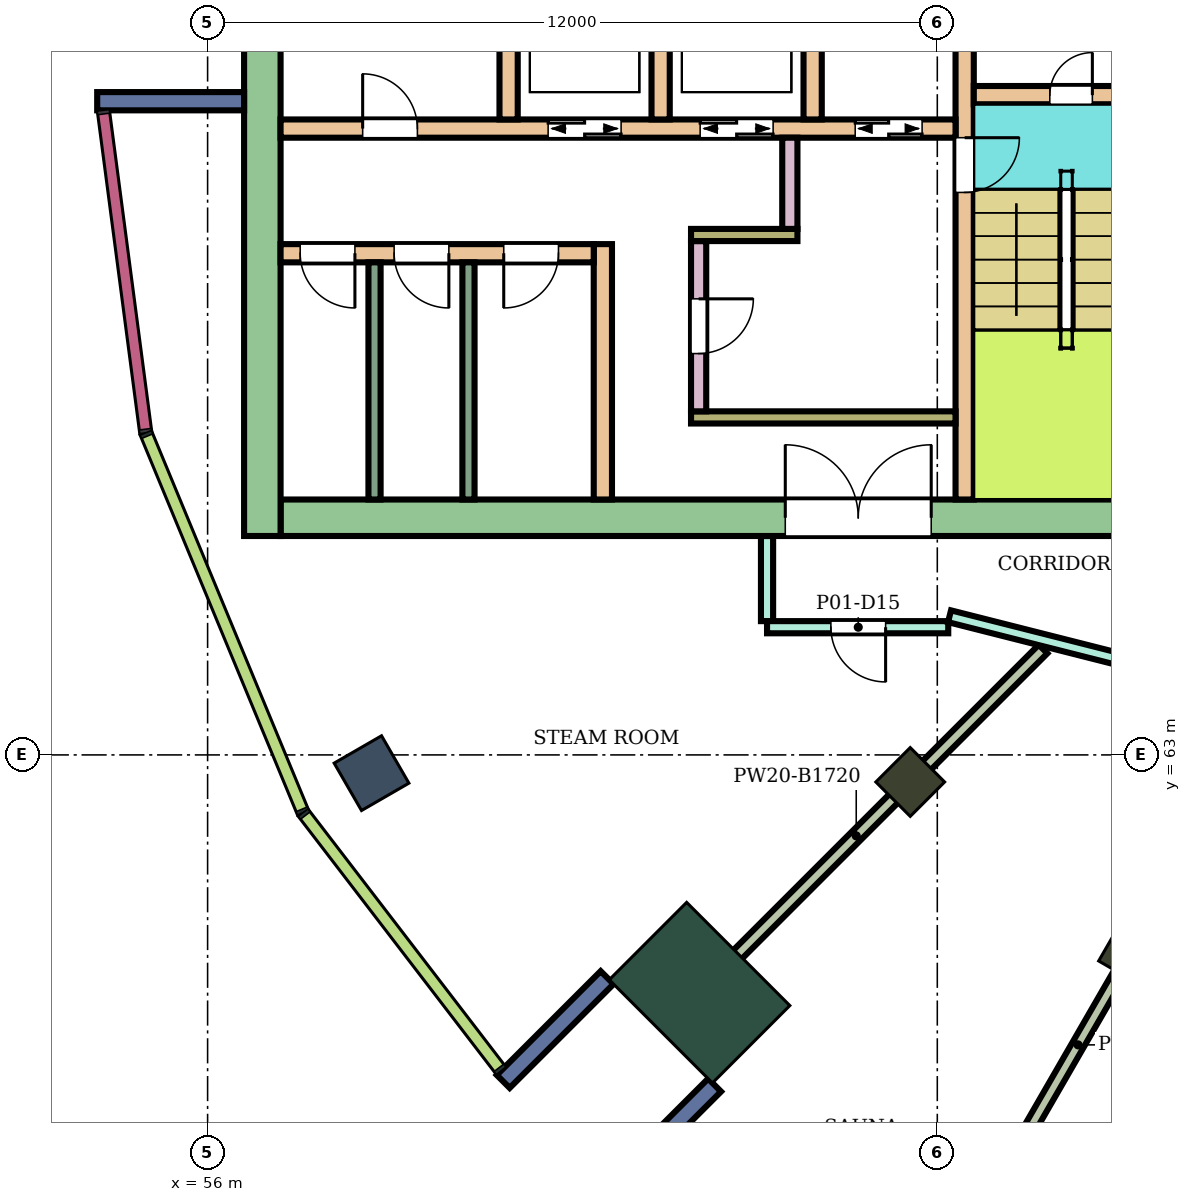
"""IFC4 building model, lengths in metres.
Left out: names, types, materials, properties, quantities, classifications, styles, units other than length and angle.
Written with IfcOpenShell. Run it as: python <this file> out.ifc"""

import sys

from ifc_helpers import new_model, si_unit, direction, frame, frame_2d, origin, origin_2d, place, context, subcontext, project, spatial, rectangle, extrude, element, fill, save


model = new_model("IFC4")
c1 = context("Model", 3, precision=1e-05, world=origin(), true_north=direction((0.0, 1.0)))
c2 = subcontext(c1, "Body", "Model", "MODEL_VIEW")
j1 = project(units=[si_unit("LENGTHUNIT", "METRE"), si_unit("PLANEANGLEUNIT", "RADIAN")], contexts=[c1])
p1 = place(None, origin())
s1 = spatial("IfcSite", under=j1, at=p1, CompositionType="ELEMENT")
p2 = place(p1, origin())
s2 = spatial("IfcBuilding", under=s1, at=p2, CompositionType="ELEMENT")
p3 = place(p2, frame((0.0, 0.0, 270.9)))
s3 = spatial("IfcBuildingStorey", under=s2, at=p3, CompositionType="ELEMENT", Elevation=270.9)
p4 = place(p3, frame((58.696, 62.7, 0.0), z_axis=(0.0, 0.0, 1.0), x_axis=(-0.866025403784, -0.5, 0.0)))
e1 = element("IfcColumn", 1, at=p4, inside=s3, PredefinedType="COLUMN", context=c2, shape_type="SweptSolid", body=[
    extrude(rectangle(XDim=0.9, YDim=0.9, at=origin_2d()), origin(), (0.0, 0.0, 1.0), 4.8),
])
for number, where, z_axis, x_axis in (
    (2, (67.555, 62.555, 0.0), (0.0, 0.0, 1.0), (-0.707, -0.707, 0.0)),
    (3, (71.2, 59.758, 0.0), (0.0, 0.0, 1.0), (-0.5, -0.866, 0.0)),
):
    element("IfcColumn", number, at=place(p3, frame(where, z_axis=z_axis, x_axis=x_axis)), inside=s3, PredefinedType="COLUMN", context=c2, shape_type="SweptSolid", body=[
        extrude(rectangle(XDim=0.8, YDim=0.8, at=origin_2d()), origin(), (0.0, 0.0, 1.0), 4.8),
    ])
p5 = place(p3, frame((64.09, 59.09, 0.0), z_axis=(0.0, 0.0, 1.0), x_axis=(-0.707106781187, -0.707106781187, 0.0)))
e4 = element("IfcColumn", 4, at=p5, inside=s3, PredefinedType="COLUMN", context=c2, shape_type="SweptSolid", body=[
    extrude(rectangle(XDim=1.8, YDim=2.4, at=origin_2d()), origin(), (0.0, 0.0, 1.0), 4.8),
])
p6 = place(p3, frame((72.1, 66.9, 0.0), z_axis=(0.0, 0.0, 1.0), x_axis=(-1.0, 0.0, 0.0)))
e5 = element("IfcWall", 5, at=p6, inside=s3, PredefinedType="SHEAR", context=c2, shape_type="SweptSolid", body=[
    extrude(rectangle(XDim=14.9, YDim=0.6, at=frame_2d((7.45, 0.0))), origin(), (0.0, 0.0, 1.0), 4.48),
])
p7 = place(p6, frame((4.2, 0.0, 0.0)))
e6 = element("IfcOpeningElement", 6, at=p7, cuts=e5, PredefinedType="OPENING", context=c2, shape_type="SweptSolid", body=[
    extrude(rectangle(XDim=2.4, YDim=2.4, at=frame_2d((1.2, 1.2))), frame((0.0, 0.31, 0.0), z_axis=(0.0, -1.0, 0.0), x_axis=(1.0, 0.0, 0.0)), (0.0, 0.0, 1.0), 0.62),
])
p8 = place(p3, frame((56.9, 83.4, 0.0), z_axis=(0.0, 0.0, 1.0), x_axis=(0.0, -1.0, 0.0)))
e7 = element("IfcWall", 7, at=p8, inside=s3, PredefinedType="SHEAR", context=c2, shape_type="SweptSolid", body=[
    extrude(rectangle(XDim=16.8, YDim=0.6, at=frame_2d((8.4, 0.0))), origin(), (0.0, 0.0, 1.0), 4.48),
])
p9 = place(p3, frame((68.45, 75.0, 0.0), z_axis=(0.0, 0.0, 1.0), x_axis=(0.0, -1.0, 0.0)))
e8 = element("IfcWall", 8, at=p9, inside=s3, PredefinedType="SHEAR", context=c2, shape_type="SweptSolid", body=[
    extrude(rectangle(XDim=7.8, YDim=0.3, at=frame_2d((3.9, 0.0))), origin(), (0.0, 0.0, 1.0), 4.48),
])
p10 = place(p9, frame((1.85, 0.0, 0.0)))
e9 = element("IfcOpeningElement", 9, at=p10, cuts=e8, PredefinedType="OPENING", context=c2, shape_type="SweptSolid", body=[
    extrude(rectangle(XDim=0.9, YDim=2.1, at=frame_2d((0.45, 1.05))), frame((0.0, 0.16, 0.0), z_axis=(0.0, -1.0, 0.0), x_axis=(1.0, 0.0, 0.0)), (0.0, 0.0, 1.0), 0.32),
])
p11 = place(p3, frame((71.65, 73.85, 0.0), z_axis=(0.0, 0.0, 1.0), x_axis=(-1.0, 0.0, 0.0)))
e10 = element("IfcWall", 10, at=p11, inside=s3, PredefinedType="SHEAR", context=c2, shape_type="SweptSolid", body=[
    extrude(rectangle(XDim=3.05, YDim=0.3, at=frame_2d((1.525, 0.0))), origin(), (0.0, 0.0, 1.0), 4.48),
])
p12 = place(p11, frame((1.1, 0.0, 0.0)))
e11 = element("IfcOpeningElement", 11, at=p12, cuts=e10, PredefinedType="OPENING", context=c2, shape_type="SweptSolid", body=[
    extrude(rectangle(XDim=0.7, YDim=2.0, at=frame_2d((0.35, 1.0))), frame((0.0, 0.16, 0.0), z_axis=(0.0, -1.0, 0.0), x_axis=(1.0, 0.0, 0.0)), (0.0, 0.0, 1.0), 0.32),
])
p13 = place(p3, frame((68.3, 73.3, 0.0), z_axis=(0.0, 0.0, 1.0), x_axis=(-1.0, 0.0, 0.0)))
e12 = element("IfcWall", 12, at=p13, inside=s3, PredefinedType="SHEAR", context=c2, shape_type="SweptSolid", body=[
    extrude(rectangle(XDim=11.1, YDim=0.3, at=frame_2d((5.55, 0.0))), origin(), (0.0, 0.0, 1.0), 4.48),
])
p14 = place(p13, frame((0.55, 0.0, 0.0)))
e13 = element("IfcOpeningElement", 13, at=p14, cuts=e12, PredefinedType="OPENING", context=c2, shape_type="SweptSolid", body=[
    extrude(rectangle(XDim=1.1, YDim=2.1, at=frame_2d((0.55, 1.05))), frame((0.0, 0.16, 0.0), z_axis=(0.0, -1.0, 0.0), x_axis=(1.0, 0.0, 0.0)), (0.0, 0.0, 1.0), 0.32),
])
p15 = place(p13, frame((3.0, 0.0, 0.0)))
e14 = element("IfcOpeningElement", 14, at=p15, cuts=e12, PredefinedType="OPENING", context=c2, shape_type="SweptSolid", body=[
    extrude(rectangle(XDim=1.2, YDim=2.1, at=frame_2d((0.6, 1.05))), frame((0.0, 0.16, 0.0), z_axis=(0.0, -1.0, 0.0), x_axis=(1.0, 0.0, 0.0)), (0.0, 0.0, 1.0), 0.32),
])
p16 = place(p13, frame((5.5, 0.0, 0.0)))
e15 = element("IfcOpeningElement", 15, at=p16, cuts=e12, PredefinedType="OPENING", context=c2, shape_type="SweptSolid", body=[
    extrude(rectangle(XDim=1.2, YDim=2.1, at=frame_2d((0.6, 1.05))), frame((0.0, 0.16, 0.0), z_axis=(0.0, -1.0, 0.0), x_axis=(1.0, 0.0, 0.0)), (0.0, 0.0, 1.0), 0.32),
])
p17 = place(p13, frame((8.85, 0.0, 0.0)))
e16 = element("IfcOpeningElement", 16, at=p17, cuts=e12, PredefinedType="OPENING", context=c2, shape_type="SweptSolid", body=[
    extrude(rectangle(XDim=0.9, YDim=2.1, at=frame_2d((0.45, 1.05))), frame((0.0, 0.16, 0.0), z_axis=(0.0, -1.0, 0.0), x_axis=(1.0, 0.0, 0.0)), (0.0, 0.0, 1.0), 0.32),
])
for number, where, z_axis, x_axis in (
    (17, (65.95, 76.0, 0.0), (0.0, 0.0, 1.0), (0.0, -1.0, 0.0)),
    (18, (63.45, 76.0, 0.0), (0.0, 0.0, 1.0), (0.0, -1.0, 0.0)),
    (19, (60.95, 76.0, 0.0), (0.0, 0.0, 1.0), (0.0, -1.0, 0.0)),
):
    element("IfcWall", number, at=place(p3, frame(where, z_axis=z_axis, x_axis=x_axis)), inside=s3, PredefinedType="SHEAR", context=c2, shape_type="SweptSolid", body=[
        extrude(rectangle(XDim=2.55, YDim=0.3, at=frame_2d((1.275, 0.0))), origin(), (0.0, 0.0, 1.0), 4.48),
    ])
p18 = place(p3, frame((68.3, 68.55, 0.0), z_axis=(0.0, 0.0, 1.0), x_axis=(-1.0, 0.0, 0.0)))
e20 = element("IfcWall", 20, at=p18, inside=s3, PredefinedType="SHEAR", context=c2, shape_type="SweptSolid", body=[
    extrude(rectangle(XDim=4.35, YDim=0.2, at=frame_2d((2.175, 0.0))), origin(), (0.0, 0.0, 1.0), 4.48),
])
p19 = place(p3, frame((64.075, 71.45, 0.0), z_axis=(0.0, 0.0, 1.0), x_axis=(0.0, -1.0, 0.0)))
e21 = element("IfcWall", 21, at=p19, inside=s3, PredefinedType="SHEAR", context=c2, shape_type="SweptSolid", body=[
    extrude(rectangle(XDim=2.8, YDim=0.25, at=frame_2d((1.4, 0.0))), origin(), (0.0, 0.0, 1.0), 4.48),
])
p20 = place(p19, frame((0.95, 0.0, 0.0)))
e22 = element("IfcOpeningElement", 22, at=p20, cuts=e21, PredefinedType="OPENING", context=c2, shape_type="SweptSolid", body=[
    extrude(rectangle(XDim=0.9, YDim=2.1, at=frame_2d((0.45, 1.05))), frame((0.0, 0.135, 0.0), z_axis=(0.0, -1.0, 0.0), x_axis=(1.0, 0.0, 0.0)), (0.0, 0.0, 1.0), 0.27),
])
p21 = place(p3, frame((65.7, 71.55, 0.0), z_axis=(0.0, 0.0, 1.0), x_axis=(-1.0, 0.0, 0.0)))
e23 = element("IfcWall", 23, at=p21, inside=s3, PredefinedType="SHEAR", context=c2, shape_type="SweptSolid", body=[
    extrude(rectangle(XDim=1.75, YDim=0.2, at=frame_2d((0.875, 0.0))), origin(), (0.0, 0.0, 1.0), 4.48),
])
p22 = place(p3, frame((65.575, 73.15, 0.0), z_axis=(0.0, 0.0, 1.0), x_axis=(0.0, -1.0, 0.0)))
e24 = element("IfcWall", 24, at=p22, inside=s3, PredefinedType="SHEAR", context=c2, shape_type="SweptSolid", body=[
    extrude(rectangle(XDim=1.5, YDim=0.25, at=frame_2d((0.75, 0.0))), origin(), (0.0, 0.0, 1.0), 4.48),
])
p23 = place(p3, frame((62.5, 71.4, 0.0), z_axis=(0.0, 0.0, 1.0), x_axis=(0.0, -1.0, 0.0)))
e25 = element("IfcWall", 25, at=p23, inside=s3, PredefinedType="SHEAR", context=c2, shape_type="SweptSolid", body=[
    extrude(rectangle(XDim=4.2, YDim=0.3, at=frame_2d((2.1, 0.0))), origin(), (0.0, 0.0, 1.0), 4.48),
])
p24 = place(p3, frame((62.35, 71.25, 0.0), z_axis=(0.0, 0.0, 1.0), x_axis=(-1.0, 0.0, 0.0)))
e26 = element("IfcWall", 26, at=p24, inside=s3, PredefinedType="SHEAR", context=c2, shape_type="SweptSolid", body=[
    extrude(rectangle(XDim=5.15, YDim=0.3, at=frame_2d((2.575, 0.0))), origin(), (0.0, 0.0, 1.0), 4.48),
])
p25 = place(p24, frame((0.58, 0.0, 0.0)))
e27 = element("IfcOpeningElement", 27, at=p25, cuts=e26, PredefinedType="OPENING", context=c2, shape_type="SweptSolid", body=[
    extrude(rectangle(XDim=0.9, YDim=2.1, at=frame_2d((0.45, 1.05))), frame((0.0, 0.16, 0.0), z_axis=(0.0, -1.0, 0.0), x_axis=(1.0, 0.0, 0.0)), (0.0, 0.0, 1.0), 0.32),
])
p26 = place(p24, frame((2.383, 0.0, 0.0)))
e28 = element("IfcOpeningElement", 28, at=p26, cuts=e26, PredefinedType="OPENING", context=c2, shape_type="SweptSolid", body=[
    extrude(rectangle(XDim=0.9, YDim=2.1, at=frame_2d((0.45, 1.05))), frame((0.0, 0.16, 0.0), z_axis=(0.0, -1.0, 0.0), x_axis=(1.0, 0.0, 0.0)), (0.0, 0.0, 1.0), 0.32),
])
p27 = place(p24, frame((3.927, 0.0, 0.0)))
e29 = element("IfcOpeningElement", 29, at=p27, cuts=e26, PredefinedType="OPENING", context=c2, shape_type="SweptSolid", body=[
    extrude(rectangle(XDim=0.9, YDim=2.1, at=frame_2d((0.45, 1.05))), frame((0.0, 0.16, 0.0), z_axis=(0.0, -1.0, 0.0), x_axis=(1.0, 0.0, 0.0)), (0.0, 0.0, 1.0), 0.32),
])
for number, where, z_axis, x_axis in (
    (30, (56.6, 73.75, 0.0), (0.0, 0.0, 1.0), (-1.0, 0.0, 0.0)),
    (31, (62.57, 59.338, 0.0), (0.0, 0.0, 1.0), (-0.707, -0.707, 0.0)),
    (32, (64.338, 57.57, 0.0), (0.0, 0.0, 1.0), (-0.707, -0.707, 0.0)),
):
    element("IfcWall", number, at=place(p3, frame(where, z_axis=z_axis, x_axis=x_axis)), inside=s3, PredefinedType="NOTDEFINED", context=c2, shape_type="SweptSolid", body=[
        extrude(rectangle(XDim=2.416, YDim=0.3, at=frame_2d((1.208, 0.0))), origin(), (0.0, 0.0, 1.0), 4.8),
    ])
p28 = place(p3, frame((63.594, 58.597, 0.0), z_axis=(0.0, 0.0, 1.0), x_axis=(0.707162972126, 0.707050585782, 0.0)))
e33 = element("IfcWall", 33, at=p28, inside=s3, PredefinedType="PARTITIONING", context=c2, shape_type="SweptSolid", body=[
    extrude(rectangle(XDim=8.689, YDim=0.2, at=frame_2d((4.345, 0.0))), origin(), (0.0, 0.0, 1.0), 3.08),
])
p29 = place(p3, frame((65.2, 65.2, 0.0), z_axis=(0.0, 0.0, 1.0), x_axis=(0.0, 1.0, 0.0)))
e34 = element("IfcWall", 34, at=p29, inside=s3, PredefinedType="PARTITIONING", context=c2, shape_type="SweptSolid", body=[
    extrude(rectangle(XDim=1.399, YDim=0.2, at=frame_2d((0.7, 0.0))), origin(), (0.0, 0.0, 1.0), 4.35),
])
p30 = place(p3, frame((65.2, 65.1, 0.0), z_axis=(0.0, 0.0, 1.0), x_axis=(1.0, 0.0, 0.0)))
e35 = element("IfcWall", 35, at=p30, inside=s3, PredefinedType="PARTITIONING", context=c2, shape_type="SweptSolid", body=[
    extrude(rectangle(XDim=2.98, YDim=0.2, at=frame_2d((1.49, 0.0))), origin(), (0.0, 0.0, 1.0), 4.35),
])
p31 = place(p30, frame((1.05, 0.0, 0.0)))
e36 = element("IfcOpeningElement", 36, at=p31, cuts=e35, PredefinedType="OPENING", context=c2, shape_type="SweptSolid", body=[
    extrude(rectangle(XDim=0.9, YDim=2.1, at=frame_2d((0.45, 1.05))), frame((0.0, 0.11, 0.0), z_axis=(0.0, -1.0, 0.0), x_axis=(1.0, 0.0, 0.0)), (0.0, 0.0, 1.0), 0.22),
])
p32 = place(p3, frame((67.097, 52.661, 0.0), z_axis=(0.0, 0.0, 1.0), x_axis=(0.500128690501, 0.865951091539, 0.0)))
e37 = element("IfcWall", 37, at=p32, inside=s3, PredefinedType="PARTITIONING", context=c2, shape_type="SweptSolid", body=[
    extrude(rectangle(XDim=12.866, YDim=0.2, at=frame_2d((6.433, 0.0))), origin(), (0.0, 0.0, 1.0), 3.08),
])
p33 = place(p3, frame((68.201, 65.28, 0.0), z_axis=(0.0, 0.0, 1.0), x_axis=(0.969376914413, -0.245577681811, 0.0)))
e38 = element("IfcWall", 38, at=p33, inside=s3, PredefinedType="PARTITIONING", context=c2, shape_type="SweptSolid", body=[
    extrude(rectangle(XDim=5.927, YDim=0.2, at=frame_2d((2.963, 0.0))), origin(), (0.0, 0.0, 1.0), 4.35),
])
p34 = place(p33, frame((3.188, 0.0, 0.0)))
e39 = element("IfcOpeningElement", 39, at=p34, cuts=e38, PredefinedType="OPENING", context=c2, shape_type="SweptSolid", body=[
    extrude(rectangle(XDim=0.9, YDim=2.1, at=frame_2d((0.45, 1.05))), frame((0.0, 0.11, 0.0), z_axis=(0.0, -1.0, 0.0), x_axis=(1.0, 0.0, 0.0)), (0.0, 0.0, 1.0), 0.22),
])
for number, where, z_axis, x_axis in (
    (40, (60.29, 71.1, 0.0), (0.0, 0.0, 1.0), (0.0, -1.0, 0.0)),
    (41, (58.745, 71.1, 0.0), (0.0, 0.0, 1.0), (0.0, -1.0, 0.0)),
):
    element("IfcWall", number, at=place(p3, frame(where, z_axis=z_axis, x_axis=x_axis)), inside=s3, PredefinedType="PARTITIONING", context=c2, shape_type="SweptSolid", body=[
        extrude(rectangle(XDim=3.9, YDim=0.2, at=frame_2d((1.95, 0.0))), origin(), (0.0, 0.0, 1.0), 4.48),
    ])
p35 = place(p31, frame((0.9, 0.0, 0.0), z_axis=(0.0, 0.0, 1.0), x_axis=(-1.0, 0.0, 0.0)))
e42 = element("IfcDoor", 42, at=p35, inside=s3, OperationType="SINGLE_SWING_LEFT", PredefinedType="DOOR", context=c2, shape_type="SweptSolid", body=[
    extrude(rectangle(XDim=0.9, YDim=2.1, at=frame_2d((0.45, 1.05))), frame((0.0, 0.025, 0.0), z_axis=(0.0, -1.0, 0.0), x_axis=(1.0, 0.0, 0.0)), (0.0, 0.0, 1.0), 0.05),
])
fill(e36, e42)
p36 = place(p12, frame((0.7, 0.0, 0.0), z_axis=(0.0, 0.0, 1.0), x_axis=(-1.0, 0.0, 0.0)))
e43 = element("IfcDoor", 43, at=p36, inside=s3, OperationType="SINGLE_SWING_RIGHT", PredefinedType="DOOR", context=c2, shape_type="SweptSolid", body=[
    extrude(rectangle(XDim=0.7, YDim=2.0, at=frame_2d((0.35, 1.0))), frame((0.0, 0.025, 0.0), z_axis=(0.0, -1.0, 0.0), x_axis=(1.0, 0.0, 0.0)), (0.0, 0.0, 1.0), 0.05),
])
fill(e11, e43)
p37 = place(p10, origin())
e44 = element("IfcDoor", 44, at=p37, inside=s3, OperationType="SINGLE_SWING_LEFT", PredefinedType="DOOR", context=c2, shape_type="SweptSolid", body=[
    extrude(rectangle(XDim=0.9, YDim=2.1, at=frame_2d((0.45, 1.05))), frame((0.0, 0.025, 0.0), z_axis=(0.0, -1.0, 0.0), x_axis=(1.0, 0.0, 0.0)), (0.0, 0.0, 1.0), 0.05),
])
fill(e9, e44)
p38 = place(p14, origin())
e45 = element("IfcDoor", 45, at=p38, inside=s3, OperationType="DOUBLE_DOOR_SLIDING", PredefinedType="DOOR", context=c2, shape_type="SweptSolid", body=[
    extrude(rectangle(XDim=1.1, YDim=2.1, at=frame_2d((0.55, 1.05))), frame((0.0, 0.025, 0.0), z_axis=(0.0, -1.0, 0.0), x_axis=(1.0, 0.0, 0.0)), (0.0, 0.0, 1.0), 0.05),
])
fill(e13, e45)
p39 = place(p15, origin())
e46 = element("IfcDoor", 46, at=p39, inside=s3, OperationType="DOUBLE_DOOR_SLIDING", PredefinedType="DOOR", context=c2, shape_type="SweptSolid", body=[
    extrude(rectangle(XDim=1.2, YDim=2.1, at=frame_2d((0.6, 1.05))), frame((0.0, 0.025, 0.0), z_axis=(0.0, -1.0, 0.0), x_axis=(1.0, 0.0, 0.0)), (0.0, 0.0, 1.0), 0.05),
])
fill(e14, e46)
p40 = place(p16, origin())
e47 = element("IfcDoor", 47, at=p40, inside=s3, OperationType="DOUBLE_DOOR_SLIDING", PredefinedType="DOOR", context=c2, shape_type="SweptSolid", body=[
    extrude(rectangle(XDim=1.2, YDim=2.1, at=frame_2d((0.6, 1.05))), frame((0.0, 0.025, 0.0), z_axis=(0.0, -1.0, 0.0), x_axis=(1.0, 0.0, 0.0)), (0.0, 0.0, 1.0), 0.05),
])
fill(e15, e47)
p41 = place(p17, frame((0.9, 0.0, 0.0), z_axis=(0.0, 0.0, 1.0), x_axis=(-1.0, 0.0, 0.0)))
e48 = element("IfcDoor", 48, at=p41, inside=s3, OperationType="SINGLE_SWING_LEFT", PredefinedType="DOOR", context=c2, shape_type="SweptSolid", body=[
    extrude(rectangle(XDim=0.9, YDim=2.1, at=frame_2d((0.45, 1.05))), frame((0.0, 0.025, 0.0), z_axis=(0.0, -1.0, 0.0), x_axis=(1.0, 0.0, 0.0)), (0.0, 0.0, 1.0), 0.05),
])
fill(e16, e48)
p42 = place(p20, origin())
e49 = element("IfcDoor", 49, at=p42, inside=s3, OperationType="SINGLE_SWING_LEFT", PredefinedType="DOOR", context=c2, shape_type="SweptSolid", body=[
    extrude(rectangle(XDim=0.9, YDim=2.1, at=frame_2d((0.45, 1.05))), frame((0.0, 0.025, 0.0), z_axis=(0.0, -1.0, 0.0), x_axis=(1.0, 0.0, 0.0)), (0.0, 0.0, 1.0), 0.05),
])
fill(e22, e49)
p43 = place(p25, origin())
e50 = element("IfcDoor", 50, at=p43, inside=s3, OperationType="SINGLE_SWING_RIGHT", PredefinedType="DOOR", context=c2, shape_type="SweptSolid", body=[
    extrude(rectangle(XDim=0.9, YDim=2.1, at=frame_2d((0.45, 1.05))), frame((0.0, 0.025, 0.0), z_axis=(0.0, -1.0, 0.0), x_axis=(1.0, 0.0, 0.0)), (0.0, 0.0, 1.0), 0.05),
])
fill(e27, e50)
p44 = place(p26, origin())
e51 = element("IfcDoor", 51, at=p44, inside=s3, OperationType="SINGLE_SWING_LEFT", PredefinedType="DOOR", context=c2, shape_type="SweptSolid", body=[
    extrude(rectangle(XDim=0.9, YDim=2.1, at=frame_2d((0.45, 1.05))), frame((0.0, 0.025, 0.0), z_axis=(0.0, -1.0, 0.0), x_axis=(1.0, 0.0, 0.0)), (0.0, 0.0, 1.0), 0.05),
])
fill(e28, e51)
p45 = place(p27, origin())
e52 = element("IfcDoor", 52, at=p45, inside=s3, OperationType="SINGLE_SWING_LEFT", PredefinedType="DOOR", context=c2, shape_type="SweptSolid", body=[
    extrude(rectangle(XDim=0.9, YDim=2.1, at=frame_2d((0.45, 1.05))), frame((0.0, 0.025, 0.0), z_axis=(0.0, -1.0, 0.0), x_axis=(1.0, 0.0, 0.0)), (0.0, 0.0, 1.0), 0.05),
])
fill(e29, e52)
p46 = place(p7, frame((2.4, 0.0, 0.0), z_axis=(0.0, 0.0, 1.0), x_axis=(-1.0, 0.0, 0.0)))
e53 = element("IfcDoor", 53, at=p46, inside=s3, OperationType="DOUBLE_DOOR_SINGLE_SWING", PredefinedType="DOOR", context=c2, shape_type="SweptSolid", body=[
    extrude(rectangle(XDim=2.4, YDim=2.4, at=frame_2d((1.2, 1.2))), frame((0.0, 0.025, 0.0), z_axis=(0.0, -1.0, 0.0), x_axis=(1.0, 0.0, 0.0)), (0.0, 0.0, 1.0), 0.05),
])
fill(e6, e53)
save(model, sys.argv[1])
